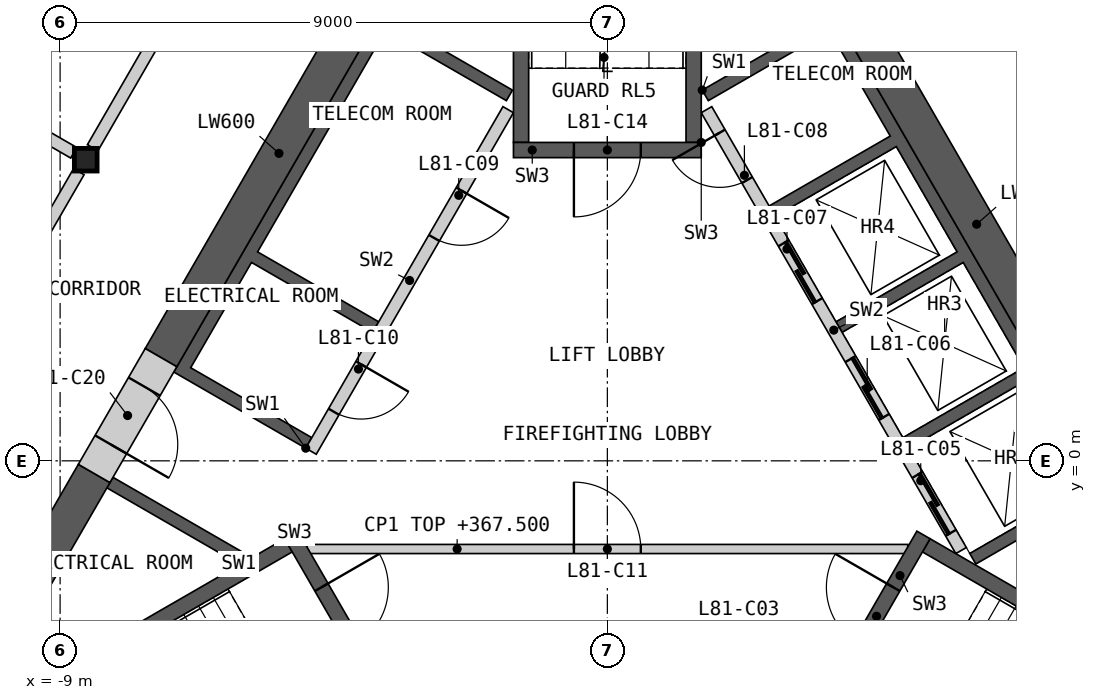
"""IFC4 building model, lengths in metres.
Left out: names, types, materials, properties, quantities, classifications, styles, units other than length and angle.
Written with IfcOpenShell. Run it as: python <this file> out.ifc"""

import sys

from ifc_helpers import new_model, si_unit, direction, frame, frame_2d, origin, origin_2d, place, context, subcontext, project, spatial, polyline, rectangle, i_section, outline, extrude, element, fill, save


model = new_model("IFC4")
c1 = context("Model", 3, precision=1e-05, world=origin(), true_north=direction((0.0, 1.0)))
c2 = subcontext(c1, "Body", "Model", "MODEL_VIEW")
j1 = project(units=[si_unit("LENGTHUNIT", "METRE"), si_unit("PLANEANGLEUNIT", "RADIAN")], contexts=[c1])
p1 = place(None, origin())
s1 = spatial("IfcSite", under=j1, at=p1, CompositionType="ELEMENT")
p2 = place(p1, origin())
s2 = spatial("IfcBuilding", under=s1, at=p2, CompositionType="ELEMENT")
p3 = place(p2, frame((0.0, 0.0, 364.4)))
s3 = spatial("IfcBuildingStorey", under=s2, at=p3, CompositionType="ELEMENT", Elevation=364.4)
p4 = place(p3, frame((-8.578, 4.953, 0.0), z_axis=(0.0, 0.0, 1.0), x_axis=(1.0, 0.0, 0.0)))
e1 = element("IfcColumn", 1, at=p4, inside=s3, PredefinedType="COLUMN", context=c2, shape_type="SweptSolid", body=[
    extrude(i_section(OverallWidth=0.374, OverallDepth=0.372, WebThickness=0.016, FlangeThickness=0.026, at=origin_2d()), origin(), (0.0, 0.0, 1.0), 3.4),
])
p5 = place(p3, origin())
e2 = element("IfcWall", 2, at=p5, inside=s3, PredefinedType="SHEAR", context=c2, shape_type="SweptSolid", body=[
    extrude(outline(polyline([(1.561, 6.097), (3.731, 7.35), (8.231, -0.444), (6.061, -1.697), (5.96, -1.524), (7.952, -0.374), (6.952, 1.358), (4.96, 0.208), (4.861, 0.381), (6.852, 1.531), (5.852, 3.263), (3.861, 2.113), (3.76, 2.287), (5.752, 3.437), (4.752, 5.169), (2.76, 4.019), (2.66, 4.192), (4.652, 5.342), (3.652, 7.074), (1.66, 5.924), (1.561, 6.097)])), origin(), (0.0, 0.0, 1.0), 3.1),
])
p6 = place(p3, frame((5.817, -1.476, 0.0), z_axis=(0.0, 0.0, 1.0), x_axis=(-0.500002616675, 0.866023893041, 0.0)))
e3 = element("IfcWall", 3, at=p6, inside=s3, PredefinedType="SOLIDWALL", context=c2, shape_type="SweptSolid", body=[
    extrude(rectangle(XDim=8.373, YDim=0.2, at=frame_2d((4.187, 0.0))), origin(), (0.0, 0.0, 1.0), 3.1),
])
p7 = place(p6, frame((0.337, 0.0, 0.0)))
e4 = element("IfcOpeningElement", 4, at=p7, cuts=e3, PredefinedType="OPENING", context=c2, shape_type="SweptSolid", body=[
    extrude(rectangle(XDim=1.1, YDim=2.1, at=frame_2d((0.55, 1.05))), frame((0.0, 0.11, 0.0), z_axis=(0.0, -1.0, 0.0), x_axis=(1.0, 0.0, 0.0)), (0.0, 0.0, 1.0), 0.22),
])
p8 = place(p6, frame((2.537, 0.0, 0.0)))
e5 = element("IfcOpeningElement", 5, at=p8, cuts=e3, PredefinedType="OPENING", context=c2, shape_type="SweptSolid", body=[
    extrude(rectangle(XDim=1.1, YDim=2.1, at=frame_2d((0.55, 1.05))), frame((0.0, 0.11, 0.0), z_axis=(0.0, -1.0, 0.0), x_axis=(1.0, 0.0, 0.0)), (0.0, 0.0, 1.0), 0.22),
])
p9 = place(p6, frame((4.737, 0.0, 0.0)))
e6 = element("IfcOpeningElement", 6, at=p9, cuts=e3, PredefinedType="OPENING", context=c2, shape_type="SweptSolid", body=[
    extrude(rectangle(XDim=1.1, YDim=2.1, at=frame_2d((0.55, 1.05))), frame((0.0, 0.11, 0.0), z_axis=(0.0, -1.0, 0.0), x_axis=(1.0, 0.0, 0.0)), (0.0, 0.0, 1.0), 0.22),
])
p10 = place(p6, frame((7.037, 0.0, 0.0)))
e7 = element("IfcOpeningElement", 7, at=p10, cuts=e3, PredefinedType="OPENING", context=c2, shape_type="SweptSolid", body=[
    extrude(rectangle(XDim=0.9, YDim=2.1, at=frame_2d((0.45, 1.05))), frame((0.0, 0.11, 0.0), z_axis=(0.0, -1.0, 0.0), x_axis=(1.0, 0.0, 0.0)), (0.0, 0.0, 1.0), 0.22),
])
p11 = place(p3, origin())
e8 = element("IfcWall", 8, at=p11, inside=s3, PredefinedType="SHEAR", context=c2, shape_type="SweptSolid", body=[
    extrude(outline(polyline([(-6.061, -1.697), (-8.231, -0.444), (-8.131, -0.271), (-5.96, -1.524), (-6.061, -1.697)])), origin(), (0.0, 0.0, 1.0), 3.1),
])
p12 = place(p3, origin())
e9 = element("IfcWall", 9, at=p12, inside=s3, PredefinedType="SHEAR", context=c2, shape_type="SweptSolid", body=[
    extrude(outline(polyline([(-4.96, 0.208), (-7.131, 1.461), (-3.731, 7.35), (-1.561, 6.097), (-1.66, 5.924), (-3.652, 7.074), (-5.752, 3.437), (-3.76, 2.287), (-3.861, 2.113), (-5.852, 3.263), (-6.852, 1.531), (-4.861, 0.381), (-4.96, 0.208)])), origin(), (0.0, 0.0, 1.0), 3.1),
])
p13 = place(p3, frame((-1.631, 5.776, 0.0), z_axis=(0.0, 0.0, 1.0), x_axis=(-0.499992876559, -0.866029516466, 0.0)))
e10 = element("IfcWall", 10, at=p13, inside=s3, PredefinedType="SOLIDWALL", context=c2, shape_type="SweptSolid", body=[
    extrude(rectangle(XDim=6.486, YDim=0.2, at=frame_2d((3.243, 0.0))), origin(), (0.0, 0.0, 1.0), 3.1),
])
p14 = place(p13, frame((1.537, 0.0, 0.0)))
e11 = element("IfcOpeningElement", 11, at=p14, cuts=e10, PredefinedType="OPENING", context=c2, shape_type="SweptSolid", body=[
    extrude(rectangle(XDim=0.9, YDim=2.1, at=frame_2d((0.45, 1.05))), frame((0.0, 0.11, 0.0), z_axis=(0.0, -1.0, 0.0), x_axis=(1.0, 0.0, 0.0)), (0.0, 0.0, 1.0), 0.22),
])
p15 = place(p13, frame((4.837, 0.0, 0.0)))
e12 = element("IfcOpeningElement", 12, at=p15, cuts=e10, PredefinedType="OPENING", context=c2, shape_type="SweptSolid", body=[
    extrude(rectangle(XDim=0.9, YDim=2.1, at=frame_2d((0.45, 1.05))), frame((0.0, 0.11, 0.0), z_axis=(0.0, -1.0, 0.0), x_axis=(1.0, 0.0, 0.0)), (0.0, 0.0, 1.0), 0.22),
])
p16 = place(p3, frame((-4.941, -1.45, 0.0), z_axis=(0.0, 0.0, 1.0), x_axis=(1.0, 0.0, 0.0)))
e13 = element("IfcWall", 13, at=p16, inside=s3, PredefinedType="PARTITIONING", context=c2, shape_type="SweptSolid", body=[
    extrude(rectangle(XDim=9.882, YDim=0.15, at=frame_2d((4.941, 0.0))), origin(), (0.0, 0.0, 1.0), 3.1),
])
p17 = place(p16, frame((4.391, 0.0, 0.0)))
e14 = element("IfcOpeningElement", 14, at=p17, cuts=e13, PredefinedType="OPENING", context=c2, shape_type="SweptSolid", body=[
    extrude(rectangle(XDim=1.1, YDim=2.1, at=frame_2d((0.55, 1.05))), frame((0.0, 0.085, 0.0), z_axis=(0.0, -1.0, 0.0), x_axis=(1.0, 0.0, 0.0)), (0.0, 0.0, 1.0), 0.17),
])
p18 = place(p3, origin())
e15 = element("IfcWall", 15, at=p18, inside=s3, PredefinedType="SHEAR", context=c2, shape_type="SweptSolid", body=[
    extrude(outline(polyline([(-5.307, -1.281), (-10.374, -4.206), (-10.032, -4.298), (-5.182, -1.498), (-5.307, -1.281)])), origin(), (0.0, 0.0, 1.0), 3.1),
])
p19 = place(p3, frame((-5.199, -1.219, 0.0), z_axis=(0.0, 0.0, 1.0), x_axis=(0.499982516597, -0.866035497597, 0.0)))
e16 = element("IfcWall", 16, at=p19, inside=s3, PredefinedType="SHEAR", context=c2, shape_type="SweptSolid", body=[
    extrude(rectangle(XDim=3.088, YDim=0.25, at=frame_2d((1.544, 0.0))), origin(), (0.0, 0.0, 1.0), 3.1),
])
p20 = place(p19, frame((0.994, 0.0, 0.0)))
e17 = element("IfcOpeningElement", 17, at=p20, cuts=e16, PredefinedType="OPENING", context=c2, shape_type="SweptSolid", body=[
    extrude(rectangle(XDim=1.1, YDim=2.1, at=frame_2d((0.55, 1.05))), frame((0.0, 0.135, 0.0), z_axis=(0.0, -1.0, 0.0), x_axis=(1.0, 0.0, 0.0)), (0.0, 0.0, 1.0), 0.27),
])
p21 = place(p3, origin())
e18 = element("IfcWall", 18, at=p21, inside=s3, PredefinedType="SHEAR", context=c2, shape_type="SweptSolid", body=[
    extrude(outline(polyline([(10.032, -4.298), (10.374, -4.206), (5.307, -1.281), (5.182, -1.498), (10.032, -4.298)])), origin(), (0.0, 0.0, 1.0), 3.1),
])
p22 = place(p3, frame((3.655, -3.893, 0.0), z_axis=(0.0, 0.0, 1.0), x_axis=(0.499982516597, 0.866035497597, 0.0)))
e19 = element("IfcWall", 19, at=p22, inside=s3, PredefinedType="SHEAR", context=c2, shape_type="SweptSolid", body=[
    extrude(rectangle(XDim=3.088, YDim=0.25, at=frame_2d((1.544, 0.0))), origin(), (0.0, 0.0, 1.0), 3.1),
])
p23 = place(p22, frame((0.994, 0.0, 0.0)))
e20 = element("IfcOpeningElement", 20, at=p23, cuts=e19, PredefinedType="OPENING", context=c2, shape_type="SweptSolid", body=[
    extrude(rectangle(XDim=1.1, YDim=2.1, at=frame_2d((0.55, 1.05))), frame((0.0, 0.135, 0.0), z_axis=(0.0, -1.0, 0.0), x_axis=(1.0, 0.0, 0.0)), (0.0, 0.0, 1.0), 0.27),
])
p24 = place(p3, origin())
e21 = element("IfcWall", 21, at=p24, inside=s3, PredefinedType="SHEAR", context=c2, shape_type="SweptSolid", body=[
    extrude(outline(polyline([(1.544, 5.237), (1.544, 11.087), (1.294, 10.837), (1.294, 5.237), (1.544, 5.237)])), origin(), (0.0, 0.0, 1.0), 3.1),
])
p25 = place(p3, origin())
e22 = element("IfcWall", 22, at=p25, inside=s3, PredefinedType="SHEAR", context=c2, shape_type="SweptSolid", body=[
    extrude(outline(polyline([(-1.294, 10.837), (-1.544, 11.087), (-1.544, 5.237), (-1.294, 5.237), (-1.294, 10.837)])), origin(), (0.0, 0.0, 1.0), 3.1),
])
p26 = place(p3, frame((1.544, 5.112, 0.0), z_axis=(0.0, 0.0, 1.0), x_axis=(-1.0, 0.0, 0.0)))
e23 = element("IfcWall", 23, at=p26, inside=s3, PredefinedType="SHEAR", context=c2, shape_type="SweptSolid", body=[
    extrude(rectangle(XDim=3.088, YDim=0.25, at=frame_2d((1.544, 0.0))), origin(), (0.0, 0.0, 1.0), 3.1),
])
p27 = place(p26, frame((0.994, 0.0, 0.0)))
e24 = element("IfcOpeningElement", 24, at=p27, cuts=e23, PredefinedType="OPENING", context=c2, shape_type="SweptSolid", body=[
    extrude(rectangle(XDim=1.1, YDim=2.1, at=frame_2d((0.55, 1.05))), frame((0.0, 0.135, 0.0), z_axis=(0.0, -1.0, 0.0), x_axis=(1.0, 0.0, 0.0)), (0.0, 0.0, 1.0), 0.27),
])
p28 = place(p3, frame((8.686, -0.634, 0.0), z_axis=(0.0, 0.0, 1.0), x_axis=(-0.50001836461, 0.866014800712, 0.0)))
e25 = element("IfcWall", 25, at=p28, inside=s3, PredefinedType="SHEAR", context=c2, shape_type="SweptSolid", body=[
    extrude(rectangle(XDim=10.451, YDim=0.6, at=frame_2d((5.225, 0.0))), origin(), (0.0, 0.0, 1.0), 3.1),
])
p29 = place(p3, frame((-3.461, 8.417, 0.0), z_axis=(0.0, 0.0, 1.0), x_axis=(-0.50000391502, -0.866023143435, 0.0)))
e26 = element("IfcWall", 26, at=p29, inside=s3, PredefinedType="SHEAR", context=c2, shape_type="SweptSolid", body=[
    extrude(rectangle(XDim=7.759, YDim=0.6, at=frame_2d((3.879, 0.0))), origin(), (0.0, 0.0, 1.0), 3.1),
])
p30 = place(p3, frame((-8.44, -0.208, 0.0), z_axis=(0.0, 0.0, 1.0), x_axis=(-0.500007425856, -0.866021116422, 0.0)))
e27 = element("IfcWall", 27, at=p30, inside=s3, PredefinedType="SHEAR", context=c2, shape_type="SweptSolid", body=[
    extrude(rectangle(XDim=4.969, YDim=0.6, at=frame_2d((2.484, 0.0))), origin(), (0.0, 0.0, 1.0), 3.1),
])
p31 = place(p3, frame((-7.34, 1.698, 0.0), z_axis=(0.0, 0.0, 1.0), x_axis=(-0.50002983664, -0.866008176907, 0.0)))
e28 = element("IfcWall", 28, at=p31, inside=s3, PredefinedType="SHEAR", context=c2, shape_type="SweptSolid", body=[
    extrude(rectangle(XDim=2.2, YDim=0.6, at=frame_2d((1.1, 0.0))), origin(), (0.0, 0.0, 1.0), 3.1),
])
p32 = place(p31, frame((0.55, 0.0, 0.0)))
e29 = element("IfcOpeningElement", 29, at=p32, cuts=e28, PredefinedType="OPENING", context=c2, shape_type="SweptSolid", body=[
    extrude(rectangle(XDim=1.1, YDim=2.1, at=frame_2d((0.55, 1.05))), frame((0.0, 0.31, 0.0), z_axis=(0.0, -1.0, 0.0), x_axis=(1.0, 0.0, 0.0)), (0.0, 0.0, 1.0), 0.62),
])
p33 = place(p3, frame((-8.465, 5.15, 0.0), z_axis=(0.0, 0.0, 1.0), x_axis=(0.499992155518, 0.866029932751, 0.0)))
e30 = element("IfcWall", 30, at=p33, inside=s3, PredefinedType="PARTITIONING", context=c2, shape_type="SweptSolid", body=[
    extrude(rectangle(XDim=8.123, YDim=0.2, at=frame_2d((4.062, 0.0))), origin(), (0.0, 0.0, 1.0), 3.1),
])
p34 = place(p33, frame((3.587, 0.0, 0.0)))
e31 = element("IfcOpeningElement", 31, at=p34, cuts=e30, PredefinedType="OPENING", context=c2, shape_type="SweptSolid", body=[
    extrude(rectangle(XDim=0.95, YDim=2.1, at=frame_2d((0.475, 1.05))), frame((0.0, 0.11, 0.0), z_axis=(0.0, -1.0, 0.0), x_axis=(1.0, 0.0, 0.0)), (0.0, 0.0, 1.0), 0.22),
])
p35 = place(p3, frame((4.403, 12.185, 0.0), z_axis=(0.0, 0.0, 1.0), x_axis=(0.499992155518, -0.866029932751, 0.0)))
e32 = element("IfcWall", 32, at=p35, inside=s3, PredefinedType="PARTITIONING", context=c2, shape_type="SweptSolid", body=[
    extrude(rectangle(XDim=8.123, YDim=0.2, at=frame_2d((4.062, 0.0))), origin(), (0.0, 0.0, 1.0), 3.1),
])
p36 = place(p35, frame((3.762, 0.0, 0.0)))
e33 = element("IfcOpeningElement", 33, at=p36, cuts=e32, PredefinedType="OPENING", context=c2, shape_type="SweptSolid", body=[
    extrude(rectangle(XDim=1.0, YDim=2.1, at=frame_2d((0.5, 1.05))), frame((0.0, 0.11, 0.0), z_axis=(0.0, -1.0, 0.0), x_axis=(1.0, 0.0, 0.0)), (0.0, 0.0, 1.0), 0.22),
])
p37 = place(p3, frame((-12.754, -2.279, 0.0), z_axis=(0.0, 0.0, 1.0), x_axis=(0.500001682468, 0.866024432409, 0.0)))
e34 = element("IfcWall", 34, at=p37, inside=s3, PredefinedType="PARTITIONING", context=c2, shape_type="SweptSolid", body=[
    extrude(rectangle(XDim=8.124, YDim=0.2, at=frame_2d((4.062, 0.0))), origin(), (0.0, 0.0, 1.0), 3.1),
])
p38 = place(p37, frame((3.762, 0.0, 0.0)))
e35 = element("IfcOpeningElement", 35, at=p38, cuts=e34, PredefinedType="OPENING", context=c2, shape_type="SweptSolid", body=[
    extrude(rectangle(XDim=1.0, YDim=2.1, at=frame_2d((0.5, 1.05))), frame((0.0, 0.11, 0.0), z_axis=(0.0, -1.0, 0.0), x_axis=(1.0, 0.0, 0.0)), (0.0, 0.0, 1.0), 0.22),
])
p39 = place(p3, frame((-11.473, 6.74, 0.0), z_axis=(0.0, 0.0, 1.0), x_axis=(0.499993542657, 0.866029131901, 0.0)))
e36 = element("IfcWall", 36, at=p39, inside=s3, PredefinedType="PARTITIONING", context=c2, shape_type="SweptSolid", body=[
    extrude(rectangle(XDim=14.994, YDim=0.2, at=frame_2d((7.497, 0.0))), origin(), (0.0, 0.0, 1.0), 2.33),
])
p40 = place(p39, frame((10.383, 0.0, 0.0)))
e37 = element("IfcOpeningElement", 37, at=p40, cuts=e36, PredefinedType="OPENING", context=c2, shape_type="SweptSolid", body=[
    extrude(rectangle(XDim=0.95, YDim=2.1, at=frame_2d((0.475, 1.05))), frame((0.0, 0.11, 0.0), z_axis=(0.0, -1.0, 0.0), x_axis=(1.0, 0.0, 0.0)), (0.0, 0.0, 1.0), 0.22),
])
p41 = place(p3, frame((-18.869, 10.894, 0.0), z_axis=(0.0, 0.0, 1.0), x_axis=(0.866023724155, -0.500002909193, 0.0)))
e38 = element("IfcWall", 38, at=p41, inside=s3, PredefinedType="PARTITIONING", context=c2, shape_type="SweptSolid", body=[
    extrude(rectangle(XDim=11.655, YDim=0.2, at=frame_2d((5.827, 0.0))), origin(), (0.0, 0.0, 1.0), 2.33),
])
p42 = place(p7, origin())
e39 = element("IfcDoor", 39, at=p42, inside=s3, OperationType="SLIDING_TO_LEFT", PredefinedType="DOOR", context=c2, shape_type="SweptSolid", body=[
    extrude(rectangle(XDim=1.1, YDim=2.1, at=frame_2d((0.55, 1.05))), frame((0.0, 0.025, 0.0), z_axis=(0.0, -1.0, 0.0), x_axis=(1.0, 0.0, 0.0)), (0.0, 0.0, 1.0), 0.05),
])
fill(e4, e39)
p43 = place(p8, origin())
e40 = element("IfcDoor", 40, at=p43, inside=s3, OperationType="SLIDING_TO_LEFT", PredefinedType="DOOR", context=c2, shape_type="SweptSolid", body=[
    extrude(rectangle(XDim=1.1, YDim=2.1, at=frame_2d((0.55, 1.05))), frame((0.0, 0.025, 0.0), z_axis=(0.0, -1.0, 0.0), x_axis=(1.0, 0.0, 0.0)), (0.0, 0.0, 1.0), 0.05),
])
fill(e5, e40)
p44 = place(p9, origin())
e41 = element("IfcDoor", 41, at=p44, inside=s3, OperationType="SLIDING_TO_LEFT", PredefinedType="DOOR", context=c2, shape_type="SweptSolid", body=[
    extrude(rectangle(XDim=1.1, YDim=2.1, at=frame_2d((0.55, 1.05))), frame((0.0, 0.025, 0.0), z_axis=(0.0, -1.0, 0.0), x_axis=(1.0, 0.0, 0.0)), (0.0, 0.0, 1.0), 0.05),
])
fill(e6, e41)
p45 = place(p10, origin())
e42 = element("IfcDoor", 42, at=p45, inside=s3, OperationType="SINGLE_SWING_RIGHT", PredefinedType="DOOR", context=c2, shape_type="SweptSolid", body=[
    extrude(rectangle(XDim=0.9, YDim=2.1, at=frame_2d((0.45, 1.05))), frame((0.0, 0.025, 0.0), z_axis=(0.0, -1.0, 0.0), x_axis=(1.0, 0.0, 0.0)), (0.0, 0.0, 1.0), 0.05),
])
fill(e7, e42)
p46 = place(p14, origin())
e43 = element("IfcDoor", 43, at=p46, inside=s3, OperationType="SINGLE_SWING_LEFT", PredefinedType="DOOR", context=c2, shape_type="SweptSolid", body=[
    extrude(rectangle(XDim=0.9, YDim=2.1, at=frame_2d((0.45, 1.05))), frame((0.0, 0.025, 0.0), z_axis=(0.0, -1.0, 0.0), x_axis=(1.0, 0.0, 0.0)), (0.0, 0.0, 1.0), 0.05),
])
fill(e11, e43)
p47 = place(p15, origin())
e44 = element("IfcDoor", 44, at=p47, inside=s3, OperationType="SINGLE_SWING_LEFT", PredefinedType="DOOR", context=c2, shape_type="SweptSolid", body=[
    extrude(rectangle(XDim=0.9, YDim=2.1, at=frame_2d((0.45, 1.05))), frame((0.0, 0.025, 0.0), z_axis=(0.0, -1.0, 0.0), x_axis=(1.0, 0.0, 0.0)), (0.0, 0.0, 1.0), 0.05),
])
fill(e12, e44)
p48 = place(p17, origin())
e45 = element("IfcDoor", 45, at=p48, inside=s3, OperationType="SINGLE_SWING_LEFT", PredefinedType="DOOR", context=c2, shape_type="SweptSolid", body=[
    extrude(rectangle(XDim=1.1, YDim=2.1, at=frame_2d((0.55, 1.05))), frame((0.0, 0.025, 0.0), z_axis=(0.0, -1.0, 0.0), x_axis=(1.0, 0.0, 0.0)), (0.0, 0.0, 1.0), 0.05),
])
fill(e14, e45)
p49 = place(p20, origin())
e46 = element("IfcDoor", 46, at=p49, inside=s3, OperationType="SINGLE_SWING_LEFT", PredefinedType="DOOR", context=c2, shape_type="SweptSolid", body=[
    extrude(rectangle(XDim=1.1, YDim=2.1, at=frame_2d((0.55, 1.05))), frame((0.0, 0.025, 0.0), z_axis=(0.0, -1.0, 0.0), x_axis=(1.0, 0.0, 0.0)), (0.0, 0.0, 1.0), 0.05),
])
fill(e17, e46)
p50 = place(p23, origin())
e47 = element("IfcDoor", 47, at=p50, inside=s3, OperationType="SINGLE_SWING_RIGHT", PredefinedType="DOOR", context=c2, shape_type="SweptSolid", body=[
    extrude(rectangle(XDim=1.1, YDim=2.1, at=frame_2d((0.55, 1.05))), frame((0.0, 0.025, 0.0), z_axis=(0.0, -1.0, 0.0), x_axis=(1.0, 0.0, 0.0)), (0.0, 0.0, 1.0), 0.05),
])
fill(e20, e47)
p51 = place(p27, origin())
e48 = element("IfcDoor", 48, at=p51, inside=s3, OperationType="SINGLE_SWING_RIGHT", PredefinedType="DOOR", context=c2, shape_type="SweptSolid", body=[
    extrude(rectangle(XDim=1.1, YDim=2.1, at=frame_2d((0.55, 1.05))), frame((0.0, 0.025, 0.0), z_axis=(0.0, -1.0, 0.0), x_axis=(1.0, 0.0, 0.0)), (0.0, 0.0, 1.0), 0.05),
])
fill(e24, e48)
p52 = place(p32, origin())
e49 = element("IfcDoor", 49, at=p52, inside=s3, OperationType="SINGLE_SWING_RIGHT", PredefinedType="DOOR", context=c2, shape_type="SweptSolid", body=[
    extrude(rectangle(XDim=1.1, YDim=2.1, at=frame_2d((0.55, 1.05))), frame((0.0, 0.055, 0.0), z_axis=(0.0, -1.0, 0.0), x_axis=(1.0, 0.0, 0.0)), (0.0, 0.0, 1.0), 0.05),
])
fill(e29, e49)
save(model, sys.argv[1])
